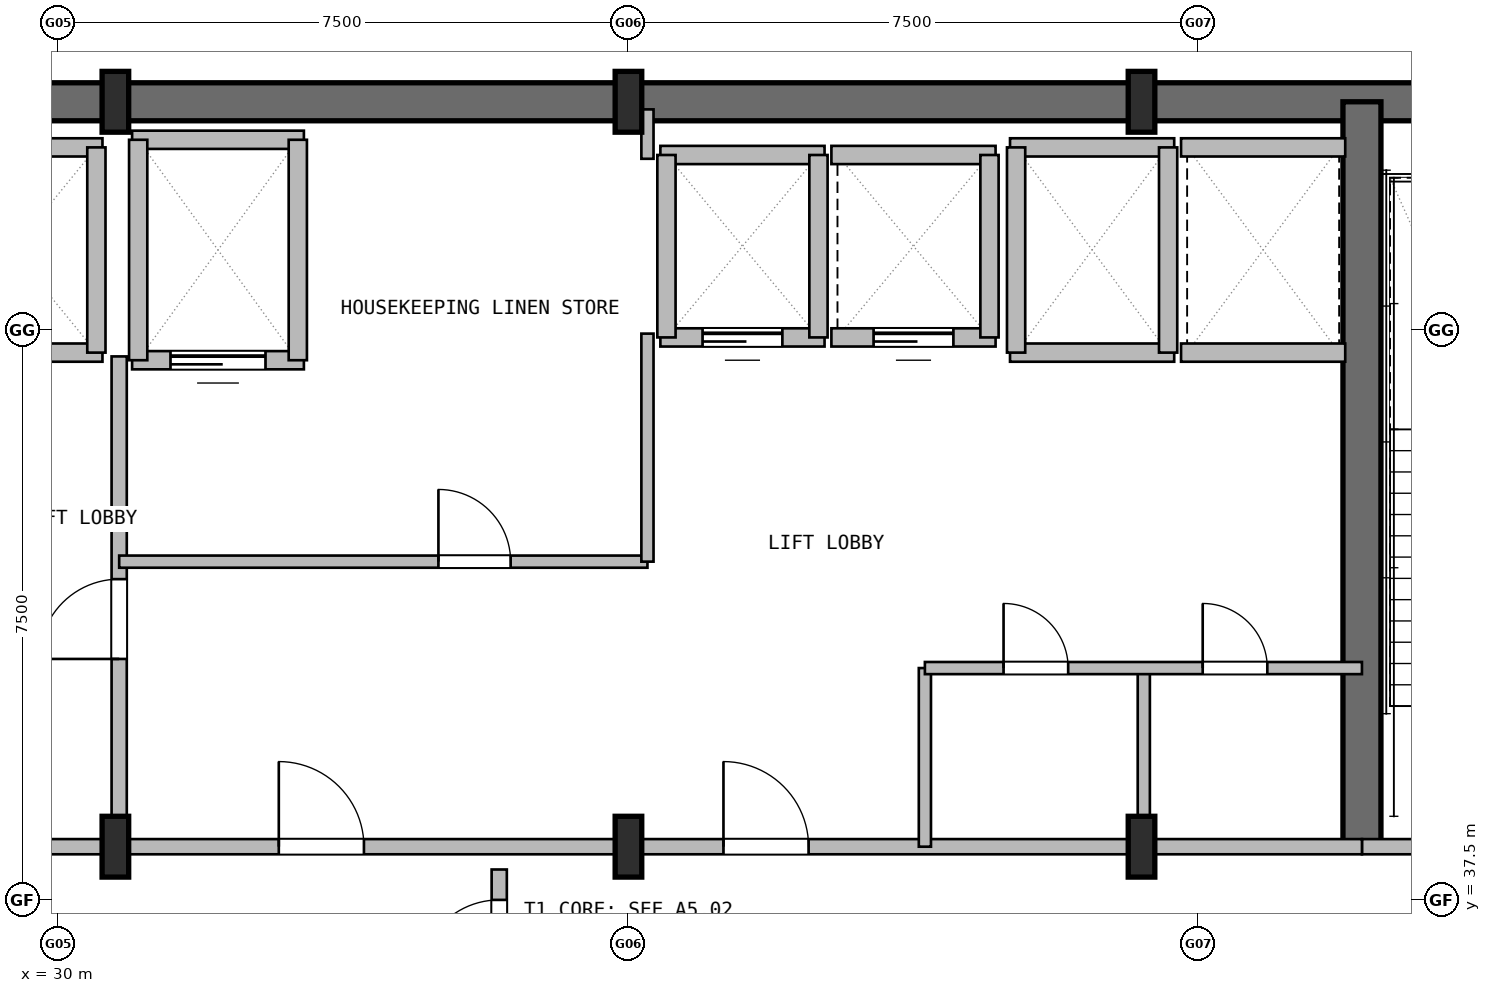
"""IFC4 building model, lengths in metres.
Left out: names, types, materials, properties, quantities, classifications, styles, units other than length and angle.
Written with IfcOpenShell. Run it as: python <this file> out.ifc"""

import sys

from ifc_helpers import new_model, si_unit, direction, frame, frame_2d, origin, origin_2d, place, context, subcontext, project, spatial, rectangle, i_section, extrude, element, fill, save


model = new_model("IFC4")
c1 = context("Model", 3, precision=1e-05, world=origin(), true_north=direction((0.0, 1.0)))
c2 = subcontext(c1, "Body", "Model", "MODEL_VIEW")
j1 = project(units=[si_unit("LENGTHUNIT", "METRE"), si_unit("PLANEANGLEUNIT", "RADIAN")], contexts=[c1])
p1 = place(None, origin())
s1 = spatial("IfcSite", under=j1, at=p1, CompositionType="ELEMENT")
p2 = place(p1, origin())
s2 = spatial("IfcBuilding", under=s1, at=p2, CompositionType="ELEMENT")
p3 = place(p2, frame((0.0, 0.0, 138.0)))
s3 = spatial("IfcBuildingStorey", under=s2, at=p3, CompositionType="ELEMENT", Elevation=138.0)
p4 = place(p3, frame((23.75, 48.0, 0.0), z_axis=(0.0, 0.0, 1.0), x_axis=(1.0, 0.0, 0.0)))
e1 = element("IfcWall", 1, at=p4, inside=s3, PredefinedType="SHEAR", context=c2, shape_type="SweptSolid", body=[
    extrude(rectangle(XDim=27.5, YDim=0.5, at=frame_2d((13.75, 0.0))), origin(), (0.0, 0.0, 1.0), 4.8),
])
p5 = place(p3, frame((47.15, 38.2, 0.0), z_axis=(0.0, 0.0, 1.0), x_axis=(0.0, 1.0, 0.0)))
e2 = element("IfcWall", 2, at=p5, inside=s3, PredefinedType="SHEAR", context=c2, shape_type="SweptSolid", body=[
    extrude(rectangle(XDim=9.8, YDim=0.5, at=frame_2d((4.9, 0.0))), origin(), (0.0, 0.0, 1.0), 4.8),
])
for number, where, z_axis, x_axis in (
    (3, (30.75, 38.2, 0.0), (0.0, 0.0, 1.0), (1.0, 0.0, 0.0)),
    (4, (30.75, 48.0, 0.0), (0.0, 0.0, 1.0), (1.0, 0.0, 0.0)),
    (5, (37.5, 38.2, 0.0), (0.0, 0.0, 1.0), (1.0, 0.0, 0.0)),
    (6, (37.5, 48.0, 0.0), (0.0, 0.0, 1.0), (1.0, 0.0, 0.0)),
    (7, (44.25, 38.2, 0.0), (0.0, 0.0, 1.0), (1.0, 0.0, 0.0)),
    (8, (44.25, 48.0, 0.0), (0.0, 0.0, 1.0), (1.0, 0.0, 0.0)),
):
    element("IfcColumn", number, at=place(p3, frame(where, z_axis=z_axis, x_axis=x_axis)), inside=s3, PredefinedType="COLUMN", context=c2, shape_type="SweptSolid", body=[
        extrude(i_section(OverallWidth=0.35, OverallDepth=0.8, WebThickness=0.018, FlangeThickness=0.032, at=origin_2d()), origin(), (0.0, 0.0, 1.0), 4.8),
    ])
p6 = place(p3, frame((47.15, 38.2, 0.0), z_axis=(0.0, 0.0, 1.0), x_axis=(1.0, 0.0, 0.0)))
e9 = element("IfcWall", 9, at=p6, inside=s3, PredefinedType="PARTITIONING", context=c2, shape_type="SweptSolid", body=[
    extrude(rectangle(XDim=3.85, YDim=0.2, at=frame_2d((1.925, 0.0))), origin(), (0.0, 0.0, 1.0), 3.88),
])
p7 = place(p6, frame((0.75, 0.0, 0.0)))
e10 = element("IfcOpeningElement", 10, at=p7, cuts=e9, PredefinedType="OPENING", context=c2, shape_type="SweptSolid", body=[
    extrude(rectangle(XDim=1.12, YDim=2.1, at=frame_2d((0.56, 1.05))), frame((0.0, 0.11, 0.0), z_axis=(0.0, -1.0, 0.0), x_axis=(1.0, 0.0, 0.0)), (0.0, 0.0, 1.0), 0.22),
])
p8 = place(p3, frame((30.8, 38.2, 0.0), z_axis=(0.0, 0.0, 1.0), x_axis=(0.0, 1.0, 0.0)))
e11 = element("IfcWall", 11, at=p8, inside=s3, PredefinedType="PARTITIONING", context=c2, shape_type="SweptSolid", body=[
    extrude(rectangle(XDim=6.45, YDim=0.2, at=frame_2d((3.225, 0.0))), origin(), (0.0, 0.0, 1.0), 3.88),
])
p9 = place(p8, frame((2.47, 0.0, 0.0)))
e12 = element("IfcOpeningElement", 12, at=p9, cuts=e11, PredefinedType="OPENING", context=c2, shape_type="SweptSolid", body=[
    extrude(rectangle(XDim=1.05, YDim=2.1, at=frame_2d((0.525, 1.05))), frame((0.0, 0.11, 0.0), z_axis=(0.0, -1.0, 0.0), x_axis=(1.0, 0.0, 0.0)), (0.0, 0.0, 1.0), 0.22),
])
p10 = place(p3, frame((27.95, 38.2, 0.0), z_axis=(0.0, 0.0, 1.0), x_axis=(1.0, 0.0, 0.0)))
e13 = element("IfcWall", 13, at=p10, inside=s3, PredefinedType="PARTITIONING", context=c2, shape_type="SweptSolid", body=[
    extrude(rectangle(XDim=2.85, YDim=0.2, at=frame_2d((1.425, 0.0))), origin(), (0.0, 0.0, 1.0), 3.88),
])
p11 = place(p10, frame((0.75, 0.0, 0.0)))
e14 = element("IfcOpeningElement", 14, at=p11, cuts=e13, PredefinedType="OPENING", context=c2, shape_type="SweptSolid", body=[
    extrude(rectangle(XDim=1.05, YDim=2.1, at=frame_2d((0.525, 1.05))), frame((0.0, 0.11, 0.0), z_axis=(0.0, -1.0, 0.0), x_axis=(1.0, 0.0, 0.0)), (0.0, 0.0, 1.0), 0.22),
])
p12 = place(p3, frame((30.8, 38.2, 0.0), z_axis=(0.0, 0.0, 1.0), x_axis=(1.0, 0.0, 0.0)))
e15 = element("IfcWall", 15, at=p12, inside=s3, PredefinedType="PARTITIONING", context=c2, shape_type="SweptSolid", body=[
    extrude(rectangle(XDim=16.35, YDim=0.2, at=frame_2d((8.175, 0.0))), origin(), (0.0, 0.0, 1.0), 3.88),
])
p13 = place(p12, frame((2.1, 0.0, 0.0)))
e16 = element("IfcOpeningElement", 16, at=p13, cuts=e15, PredefinedType="OPENING", context=c2, shape_type="SweptSolid", body=[
    extrude(rectangle(XDim=1.12, YDim=2.1, at=frame_2d((0.56, 1.05))), frame((0.0, 0.11, 0.0), z_axis=(0.0, -1.0, 0.0), x_axis=(1.0, 0.0, 0.0)), (0.0, 0.0, 1.0), 0.22),
])
p14 = place(p12, frame((7.95, 0.0, 0.0)))
e17 = element("IfcOpeningElement", 17, at=p14, cuts=e15, PredefinedType="OPENING", context=c2, shape_type="SweptSolid", body=[
    extrude(rectangle(XDim=1.12, YDim=2.1, at=frame_2d((0.56, 1.05))), frame((0.0, 0.11, 0.0), z_axis=(0.0, -1.0, 0.0), x_axis=(1.0, 0.0, 0.0)), (0.0, 0.0, 1.0), 0.22),
])
p15 = place(p3, frame((28.22, 44.7, 0.0), z_axis=(0.0, 0.0, 1.0), x_axis=(1.0, 0.0, 0.0)))
e18 = element("IfcWall", 18, at=p15, inside=s3, PredefinedType="PARTITIONING", context=c2, shape_type="SweptSolid", body=[
    extrude(rectangle(XDim=2.36, YDim=0.24, at=frame_2d((1.18, 0.0))), origin(), (0.0, 0.0, 1.0), 4.53),
])
p16 = place(p15, frame((0.705, 0.0, 0.0)))
e19 = element("IfcOpeningElement", 19, at=p16, cuts=e18, PredefinedType="OPENING", context=c2, shape_type="SweptSolid", body=[
    extrude(rectangle(XDim=0.95, YDim=2.15, at=frame_2d((0.475, 1.075))), frame((0.0, 0.13, 0.0), z_axis=(0.0, -1.0, 0.0), x_axis=(1.0, 0.0, 0.0)), (0.0, 0.0, 1.0), 0.26),
])
p17 = place(p3, frame((28.22, 47.4, 0.0), z_axis=(0.0, 0.0, 1.0), x_axis=(1.0, 0.0, 0.0)))
e20 = element("IfcWall", 20, at=p17, inside=s3, PredefinedType="PARTITIONING", context=c2, shape_type="SweptSolid", body=[
    extrude(rectangle(XDim=2.36, YDim=0.24, at=frame_2d((1.18, 0.0))), origin(), (0.0, 0.0, 1.0), 4.53),
])
p18 = place(p3, frame((30.5, 44.7, 0.0), z_axis=(0.0, 0.0, 1.0), x_axis=(0.0, 1.0, 0.0)))
e21 = element("IfcWall", 21, at=p18, inside=s3, PredefinedType="PARTITIONING", context=c2, shape_type="SweptSolid", body=[
    extrude(rectangle(XDim=2.7, YDim=0.24, at=frame_2d((1.35, 0.0))), origin(), (0.0, 0.0, 1.0), 3.88),
])
p19 = place(p3, frame((30.97, 44.6, 0.0), z_axis=(0.0, 0.0, 1.0), x_axis=(1.0, 0.0, 0.0)))
e22 = element("IfcWall", 22, at=p19, inside=s3, PredefinedType="PARTITIONING", context=c2, shape_type="SweptSolid", body=[
    extrude(rectangle(XDim=2.26, YDim=0.24, at=frame_2d((1.13, 0.0))), origin(), (0.0, 0.0, 1.0), 4.53),
])
p20 = place(p19, frame((0.505, 0.0, 0.0)))
e23 = element("IfcOpeningElement", 23, at=p20, cuts=e22, PredefinedType="OPENING", context=c2, shape_type="SweptSolid", body=[
    extrude(rectangle(XDim=1.25, YDim=2.2, at=frame_2d((0.625, 1.1))), frame((0.0, 0.13, 0.0), z_axis=(0.0, -1.0, 0.0), x_axis=(1.0, 0.0, 0.0)), (0.0, 0.0, 1.0), 0.26),
])
p21 = place(p3, frame((30.97, 47.5, 0.0), z_axis=(0.0, 0.0, 1.0), x_axis=(1.0, 0.0, 0.0)))
e24 = element("IfcWall", 24, at=p21, inside=s3, PredefinedType="PARTITIONING", context=c2, shape_type="SweptSolid", body=[
    extrude(rectangle(XDim=2.26, YDim=0.24, at=frame_2d((1.13, 0.0))), origin(), (0.0, 0.0, 1.0), 4.53),
])
for number, where, z_axis, x_axis in (
    (25, (31.05, 44.6, 0.0), (0.0, 0.0, 1.0), (0.0, 1.0, 0.0)),
    (26, (33.15, 44.6, 0.0), (0.0, 0.0, 1.0), (0.0, 1.0, 0.0)),
):
    element("IfcWall", number, at=place(p3, frame(where, z_axis=z_axis, x_axis=x_axis)), inside=s3, PredefinedType="PARTITIONING", context=c2, shape_type="SweptSolid", body=[
        extrude(rectangle(XDim=2.9, YDim=0.24, at=frame_2d((1.45, 0.0))), origin(), (0.0, 0.0, 1.0), 4.53),
    ])
p22 = place(p3, frame((37.92, 44.9, 0.0), z_axis=(0.0, 0.0, 1.0), x_axis=(1.0, 0.0, 0.0)))
e27 = element("IfcWall", 27, at=p22, inside=s3, PredefinedType="PARTITIONING", context=c2, shape_type="SweptSolid", body=[
    extrude(rectangle(XDim=2.16, YDim=0.24, at=frame_2d((1.08, 0.0))), origin(), (0.0, 0.0, 1.0), 4.53),
])
p23 = place(p22, frame((0.555, 0.0, 0.0)))
e28 = element("IfcOpeningElement", 28, at=p23, cuts=e27, PredefinedType="OPENING", context=c2, shape_type="SweptSolid", body=[
    extrude(rectangle(XDim=1.05, YDim=2.15, at=frame_2d((0.525, 1.075))), frame((0.0, 0.13, 0.0), z_axis=(0.0, -1.0, 0.0), x_axis=(1.0, 0.0, 0.0)), (0.0, 0.0, 1.0), 0.26),
])
p24 = place(p3, frame((37.92, 47.3, 0.0), z_axis=(0.0, 0.0, 1.0), x_axis=(1.0, 0.0, 0.0)))
e29 = element("IfcWall", 29, at=p24, inside=s3, PredefinedType="PARTITIONING", context=c2, shape_type="SweptSolid", body=[
    extrude(rectangle(XDim=2.16, YDim=0.24, at=frame_2d((1.08, 0.0))), origin(), (0.0, 0.0, 1.0), 4.53),
])
for number, where, z_axis, x_axis in (
    (30, (38.0, 44.9, 0.0), (0.0, 0.0, 1.0), (0.0, 1.0, 0.0)),
    (31, (40.0, 44.9, 0.0), (0.0, 0.0, 1.0), (0.0, 1.0, 0.0)),
):
    element("IfcWall", number, at=place(p3, frame(where, z_axis=z_axis, x_axis=x_axis)), inside=s3, PredefinedType="PARTITIONING", context=c2, shape_type="SweptSolid", body=[
        extrude(rectangle(XDim=2.4, YDim=0.24, at=frame_2d((1.2, 0.0))), origin(), (0.0, 0.0, 1.0), 4.53),
    ])
p25 = place(p3, frame((40.17, 44.9, 0.0), z_axis=(0.0, 0.0, 1.0), x_axis=(1.0, 0.0, 0.0)))
e32 = element("IfcWall", 32, at=p25, inside=s3, PredefinedType="PARTITIONING", context=c2, shape_type="SweptSolid", body=[
    extrude(rectangle(XDim=2.16, YDim=0.24, at=frame_2d((1.08, 0.0))), origin(), (0.0, 0.0, 1.0), 4.53),
])
p26 = place(p25, frame((0.555, 0.0, 0.0)))
e33 = element("IfcOpeningElement", 33, at=p26, cuts=e32, PredefinedType="OPENING", context=c2, shape_type="SweptSolid", body=[
    extrude(rectangle(XDim=1.05, YDim=2.15, at=frame_2d((0.525, 1.075))), frame((0.0, 0.13, 0.0), z_axis=(0.0, -1.0, 0.0), x_axis=(1.0, 0.0, 0.0)), (0.0, 0.0, 1.0), 0.26),
])
p27 = place(p3, frame((40.17, 47.3, 0.0), z_axis=(0.0, 0.0, 1.0), x_axis=(1.0, 0.0, 0.0)))
e34 = element("IfcWall", 34, at=p27, inside=s3, PredefinedType="PARTITIONING", context=c2, shape_type="SweptSolid", body=[
    extrude(rectangle(XDim=2.16, YDim=0.24, at=frame_2d((1.08, 0.0))), origin(), (0.0, 0.0, 1.0), 4.53),
])
p28 = place(p3, frame((42.25, 44.9, 0.0), z_axis=(0.0, 0.0, 1.0), x_axis=(0.0, 1.0, 0.0)))
e35 = element("IfcWall", 35, at=p28, inside=s3, PredefinedType="PARTITIONING", context=c2, shape_type="SweptSolid", body=[
    extrude(rectangle(XDim=2.4, YDim=0.24, at=frame_2d((1.2, 0.0))), origin(), (0.0, 0.0, 1.0), 4.53),
])
for number, where, z_axis, x_axis in (
    (36, (42.52, 44.7, 0.0), (0.0, 0.0, 1.0), (1.0, 0.0, 0.0)),
    (37, (42.52, 47.4, 0.0), (0.0, 0.0, 1.0), (1.0, 0.0, 0.0)),
):
    element("IfcWall", number, at=place(p3, frame(where, z_axis=z_axis, x_axis=x_axis)), inside=s3, PredefinedType="PARTITIONING", context=c2, shape_type="SweptSolid", body=[
        extrude(rectangle(XDim=2.16, YDim=0.24, at=frame_2d((1.08, 0.0))), origin(), (0.0, 0.0, 1.0), 4.53),
    ])
for number, where, z_axis, x_axis in (
    (38, (42.6, 44.7, 0.0), (0.0, 0.0, 1.0), (0.0, 1.0, 0.0)),
    (39, (44.6, 44.7, 0.0), (0.0, 0.0, 1.0), (0.0, 1.0, 0.0)),
):
    element("IfcWall", number, at=place(p3, frame(where, z_axis=z_axis, x_axis=x_axis)), inside=s3, PredefinedType="PARTITIONING", context=c2, shape_type="SweptSolid", body=[
        extrude(rectangle(XDim=2.7, YDim=0.24, at=frame_2d((1.35, 0.0))), origin(), (0.0, 0.0, 1.0), 4.53),
    ])
for number, where, z_axis, x_axis in (
    (40, (44.77, 44.7, 0.0), (0.0, 0.0, 1.0), (1.0, 0.0, 0.0)),
    (41, (44.77, 47.4, 0.0), (0.0, 0.0, 1.0), (1.0, 0.0, 0.0)),
):
    element("IfcWall", number, at=place(p3, frame(where, z_axis=z_axis, x_axis=x_axis)), inside=s3, PredefinedType="PARTITIONING", context=c2, shape_type="SweptSolid", body=[
        extrude(rectangle(XDim=2.16, YDim=0.24, at=frame_2d((1.08, 0.0))), origin(), (0.0, 0.0, 1.0), 4.53),
    ])
p29 = place(p3, frame((30.8, 41.95, 0.0), z_axis=(0.0, 0.0, 1.0), x_axis=(1.0, 0.0, 0.0)))
e42 = element("IfcWall", 42, at=p29, inside=s3, PredefinedType="PARTITIONING", context=c2, shape_type="SweptSolid", body=[
    extrude(rectangle(XDim=6.95, YDim=0.16, at=frame_2d((3.475, 0.0))), origin(), (0.0, 0.0, 1.0), 4.53),
])
p30 = place(p29, frame((4.2, 0.0, 0.0)))
e43 = element("IfcOpeningElement", 43, at=p30, cuts=e42, PredefinedType="OPENING", context=c2, shape_type="SweptSolid", body=[
    extrude(rectangle(XDim=0.95, YDim=2.1, at=frame_2d((0.475, 1.05))), frame((0.0, 0.09, 0.0), z_axis=(0.0, -1.0, 0.0), x_axis=(1.0, 0.0, 0.0)), (0.0, 0.0, 1.0), 0.18),
])
p31 = place(p3, frame((37.75, 41.95, 0.0), z_axis=(0.0, 0.0, 1.0), x_axis=(0.0, 1.0, 0.0)))
e44 = element("IfcWall", 44, at=p31, inside=s3, PredefinedType="PARTITIONING", context=c2, shape_type="SweptSolid", body=[
    extrude(rectangle(XDim=3.0, YDim=0.16, at=frame_2d((1.5, 0.0))), origin(), (0.0, 0.0, 1.0), 4.53),
])
p32 = place(p3, frame((37.75, 47.25, 0.0), z_axis=(0.0, 0.0, 1.0), x_axis=(0.0, 1.0, 0.0)))
e45 = element("IfcWall", 45, at=p32, inside=s3, PredefinedType="PARTITIONING", context=c2, shape_type="SweptSolid", body=[
    extrude(rectangle(XDim=0.65, YDim=0.16, at=frame_2d((0.325, 0.0))), origin(), (0.0, 0.0, 1.0), 4.53),
])
for number, where, z_axis, x_axis in (
    (46, (41.4, 38.2, 0.0), (0.0, 0.0, 1.0), (0.0, 1.0, 0.0)),
    (47, (44.28, 38.2, 0.0), (0.0, 0.0, 1.0), (0.0, 1.0, 0.0)),
):
    element("IfcWall", number, at=place(p3, frame(where, z_axis=z_axis, x_axis=x_axis)), inside=s3, PredefinedType="PARTITIONING", context=c2, shape_type="SweptSolid", body=[
        extrude(rectangle(XDim=2.35, YDim=0.16, at=frame_2d((1.175, 0.0))), origin(), (0.0, 0.0, 1.0), 4.53),
    ])
p33 = place(p3, frame((41.4, 40.55, 0.0), z_axis=(0.0, 0.0, 1.0), x_axis=(1.0, 0.0, 0.0)))
e48 = element("IfcWall", 48, at=p33, inside=s3, PredefinedType="PARTITIONING", context=c2, shape_type="SweptSolid", body=[
    extrude(rectangle(XDim=5.75, YDim=0.16, at=frame_2d((2.875, 0.0))), origin(), (0.0, 0.0, 1.0), 4.53),
])
p34 = place(p33, frame((1.035, 0.0, 0.0)))
e49 = element("IfcOpeningElement", 49, at=p34, cuts=e48, PredefinedType="OPENING", context=c2, shape_type="SweptSolid", body=[
    extrude(rectangle(XDim=0.85, YDim=2.05, at=frame_2d((0.425, 1.025))), frame((0.0, 0.09, 0.0), z_axis=(0.0, -1.0, 0.0), x_axis=(1.0, 0.0, 0.0)), (0.0, 0.0, 1.0), 0.18),
])
p35 = place(p33, frame((3.655, 0.0, 0.0)))
e50 = element("IfcOpeningElement", 50, at=p35, cuts=e48, PredefinedType="OPENING", context=c2, shape_type="SweptSolid", body=[
    extrude(rectangle(XDim=0.85, YDim=2.05, at=frame_2d((0.425, 1.025))), frame((0.0, 0.09, 0.0), z_axis=(0.0, -1.0, 0.0), x_axis=(1.0, 0.0, 0.0)), (0.0, 0.0, 1.0), 0.18),
])
p36 = place(p3, frame((35.8, 21.5, 0.0), z_axis=(0.0, 0.0, 1.0), x_axis=(0.0, 1.0, 0.0)))
e51 = element("IfcWall", 51, at=p36, inside=s3, PredefinedType="PARTITIONING", context=c2, shape_type="SweptSolid", body=[
    extrude(rectangle(XDim=16.4, YDim=0.2, at=frame_2d((8.2, 0.0))), origin(), (0.0, 0.0, 1.0), 4.53),
])
p37 = place(p36, frame((14.95, 0.0, 0.0)))
e52 = element("IfcOpeningElement", 52, at=p37, cuts=e51, PredefinedType="OPENING", context=c2, shape_type="SweptSolid", body=[
    extrude(rectangle(XDim=1.05, YDim=2.1, at=frame_2d((0.525, 1.05))), frame((0.0, 0.11, 0.0), z_axis=(0.0, -1.0, 0.0), x_axis=(1.0, 0.0, 0.0)), (0.0, 0.0, 1.0), 0.22),
])
p38 = place(p9, origin())
e53 = element("IfcDoor", 53, at=p38, inside=s3, OperationType="SINGLE_SWING_LEFT", PredefinedType="DOOR", context=c2, shape_type="SweptSolid", body=[
    extrude(rectangle(XDim=1.05, YDim=2.1, at=frame_2d((0.525, 1.05))), frame((0.0, 0.025, 0.0), z_axis=(0.0, -1.0, 0.0), x_axis=(1.0, 0.0, 0.0)), (0.0, 0.0, 1.0), 0.05),
])
fill(e12, e53)
p39 = place(p13, origin())
e54 = element("IfcDoor", 54, at=p39, inside=s3, OperationType="SINGLE_SWING_LEFT", PredefinedType="DOOR", context=c2, shape_type="SweptSolid", body=[
    extrude(rectangle(XDim=1.12, YDim=2.1, at=frame_2d((0.56, 1.05))), frame((0.0, 0.025, 0.0), z_axis=(0.0, -1.0, 0.0), x_axis=(1.0, 0.0, 0.0)), (0.0, 0.0, 1.0), 0.05),
])
fill(e16, e54)
p40 = place(p14, origin())
e55 = element("IfcDoor", 55, at=p40, inside=s3, OperationType="SINGLE_SWING_RIGHT", PredefinedType="DOOR", context=c2, shape_type="SweptSolid", body=[
    extrude(rectangle(XDim=1.12, YDim=2.1, at=frame_2d((0.56, 1.05))), frame((0.0, 0.025, 0.0), z_axis=(0.0, -1.0, 0.0), x_axis=(1.0, 0.0, 0.0)), (0.0, 0.0, 1.0), 0.05),
])
fill(e17, e55)
p41 = place(p20, origin())
e56 = element("IfcDoor", 56, at=p41, inside=s3, OperationType="SLIDING_TO_LEFT", PredefinedType="DOOR", context=c2, shape_type="SweptSolid", body=[
    extrude(rectangle(XDim=1.25, YDim=2.2, at=frame_2d((0.625, 1.1))), frame((0.0, 0.025, 0.0), z_axis=(0.0, -1.0, 0.0), x_axis=(1.0, 0.0, 0.0)), (0.0, 0.0, 1.0), 0.05),
])
fill(e23, e56)
p42 = place(p23, origin())
e57 = element("IfcDoor", 57, at=p42, inside=s3, OperationType="SLIDING_TO_LEFT", PredefinedType="DOOR", context=c2, shape_type="SweptSolid", body=[
    extrude(rectangle(XDim=1.05, YDim=2.15, at=frame_2d((0.525, 1.075))), frame((0.0, 0.025, 0.0), z_axis=(0.0, -1.0, 0.0), x_axis=(1.0, 0.0, 0.0)), (0.0, 0.0, 1.0), 0.05),
])
fill(e28, e57)
p43 = place(p26, origin())
e58 = element("IfcDoor", 58, at=p43, inside=s3, OperationType="SLIDING_TO_LEFT", PredefinedType="DOOR", context=c2, shape_type="SweptSolid", body=[
    extrude(rectangle(XDim=1.05, YDim=2.15, at=frame_2d((0.525, 1.075))), frame((0.0, 0.025, 0.0), z_axis=(0.0, -1.0, 0.0), x_axis=(1.0, 0.0, 0.0)), (0.0, 0.0, 1.0), 0.05),
])
fill(e33, e58)
p44 = place(p30, origin())
e59 = element("IfcDoor", 59, at=p44, inside=s3, OperationType="SINGLE_SWING_LEFT", PredefinedType="DOOR", context=c2, shape_type="SweptSolid", body=[
    extrude(rectangle(XDim=0.95, YDim=2.1, at=frame_2d((0.475, 1.05))), frame((0.0, 0.025, 0.0), z_axis=(0.0, -1.0, 0.0), x_axis=(1.0, 0.0, 0.0)), (0.0, 0.0, 1.0), 0.05),
])
fill(e43, e59)
p45 = place(p34, origin())
e60 = element("IfcDoor", 60, at=p45, inside=s3, OperationType="SINGLE_SWING_RIGHT", PredefinedType="DOOR", context=c2, shape_type="SweptSolid", body=[
    extrude(rectangle(XDim=0.85, YDim=2.05, at=frame_2d((0.425, 1.025))), frame((0.0, 0.025, 0.0), z_axis=(0.0, -1.0, 0.0), x_axis=(1.0, 0.0, 0.0)), (0.0, 0.0, 1.0), 0.05),
])
fill(e49, e60)
p46 = place(p35, origin())
e61 = element("IfcDoor", 61, at=p46, inside=s3, OperationType="SINGLE_SWING_LEFT", PredefinedType="DOOR", context=c2, shape_type="SweptSolid", body=[
    extrude(rectangle(XDim=0.85, YDim=2.05, at=frame_2d((0.425, 1.025))), frame((0.0, 0.025, 0.0), z_axis=(0.0, -1.0, 0.0), x_axis=(1.0, 0.0, 0.0)), (0.0, 0.0, 1.0), 0.05),
])
fill(e50, e61)
p47 = place(p37, origin())
e62 = element("IfcDoor", 62, at=p47, inside=s3, OperationType="SINGLE_SWING_LEFT", PredefinedType="DOOR", context=c2, shape_type="SweptSolid", body=[
    extrude(rectangle(XDim=1.05, YDim=2.1, at=frame_2d((0.525, 1.05))), frame((0.0, 0.025, 0.0), z_axis=(0.0, -1.0, 0.0), x_axis=(1.0, 0.0, 0.0)), (0.0, 0.0, 1.0), 0.05),
])
fill(e52, e62)
save(model, sys.argv[1])
